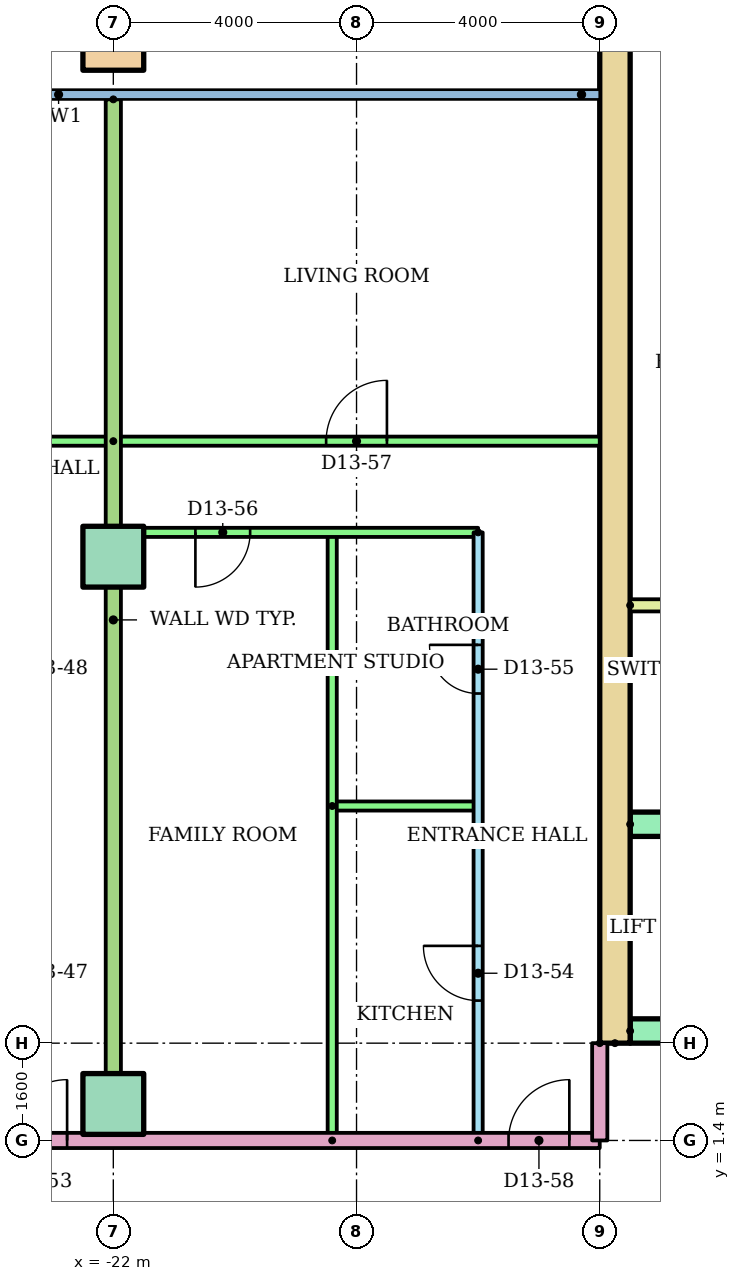
"""IFC4 building model, lengths in metres.
Left out: names, types, materials, properties, quantities, classifications, styles, units other than length and angle.
Written with IfcOpenShell. Run it as: python <this file> out.ifc"""

import sys

from ifc_helpers import new_model, si_unit, direction, frame, frame_2d, origin, origin_2d, place, context, subcontext, project, spatial, rectangle, hollow_rectangle, extrude, element, fill, save


model = new_model("IFC4")
c1 = context("Model", 3, precision=1e-05, world=origin(), true_north=direction((0.0, 1.0)))
c2 = subcontext(c1, "Body", "Model", "MODEL_VIEW")
j1 = project(units=[si_unit("LENGTHUNIT", "METRE"), si_unit("PLANEANGLEUNIT", "RADIAN")], contexts=[c1])
p1 = place(None, origin())
s1 = spatial("IfcSite", under=j1, at=p1, CompositionType="ELEMENT")
p2 = place(p1, origin())
s2 = spatial("IfcBuilding", under=s1, at=p2, CompositionType="ELEMENT")
p3 = place(p2, frame((0.0, 0.0, 51.2)))
s3 = spatial("IfcBuildingStorey", under=s2, at=p3, CompositionType="ELEMENT", Elevation=51.2)
for number, where in (
    (1, (-22.0, 2.0, 0.0)),
    (2, (-22.0, 11.0, 0.0)),
):
    element("IfcColumn", number, at=place(p3, frame(where)), inside=s3, PredefinedType="COLUMN", context=c2, shape_type="SweptSolid", body=[
        extrude(rectangle(XDim=1.0, YDim=1.0, at=origin_2d()), origin(), (0.0, 0.0, 1.0), 3.2),
    ])
p4 = place(p3, frame((-22.0, 19.5, 0.0)))
e3 = element("IfcColumn", 3, at=p4, inside=s3, PredefinedType="COLUMN", context=c2, shape_type="SweptSolid", body=[
    extrude(hollow_rectangle(XDim=1.0, YDim=1.0, WallThickness=0.05, at=origin_2d()), origin(), (0.0, 0.0, 1.0), 3.2),
])
p5 = place(p3, frame((-13.75, 3.0, 0.0), z_axis=(0.0, 0.0, 1.0), x_axis=(0.0, 1.0, 0.0)))
e4 = element("IfcWall", 4, at=p5, inside=s3, PredefinedType="SHEAR", context=c2, shape_type="SweptSolid", body=[
    extrude(rectangle(XDim=17.0, YDim=0.5, at=frame_2d((8.5, 0.0))), origin(), (0.0, 0.0, 1.0), 2.92),
])
p6 = place(p3, frame((-13.5, 3.2, 0.0)))
e5 = element("IfcWall", 5, at=p6, inside=s3, PredefinedType="SHEAR", context=c2, shape_type="SweptSolid", body=[
    extrude(rectangle(XDim=27.0, YDim=0.4, at=frame_2d((13.5, 0.0))), origin(), (0.0, 0.0, 1.0), 2.92),
])
p7 = place(p6, frame((6.861, 0.0, 0.0)))
e6 = element("IfcOpeningElement", 6, at=p7, cuts=e5, PredefinedType="OPENING", context=c2, shape_type="SweptSolid", body=[
    extrude(rectangle(XDim=1.1, YDim=2.1, at=frame_2d((0.55, 1.05))), frame((0.0, 0.21, 0.0), z_axis=(0.0, -1.0, 0.0), x_axis=(1.0, 0.0, 0.0)), (0.0, 0.0, 1.0), 0.42),
])
p8 = place(p6, frame((9.906, 0.0, 0.0)))
e7 = element("IfcOpeningElement", 7, at=p8, cuts=e5, PredefinedType="OPENING", context=c2, shape_type="SweptSolid", body=[
    extrude(rectangle(XDim=1.1, YDim=2.1, at=frame_2d((0.55, 1.05))), frame((0.0, 0.21, 0.0), z_axis=(0.0, -1.0, 0.0), x_axis=(1.0, 0.0, 0.0)), (0.0, 0.0, 1.0), 0.42),
])
p9 = place(p6, frame((15.994, 0.0, 0.0)))
e8 = element("IfcOpeningElement", 8, at=p9, cuts=e5, PredefinedType="OPENING", context=c2, shape_type="SweptSolid", body=[
    extrude(rectangle(XDim=1.1, YDim=2.1, at=frame_2d((0.55, 1.05))), frame((0.0, 0.21, 0.0), z_axis=(0.0, -1.0, 0.0), x_axis=(1.0, 0.0, 0.0)), (0.0, 0.0, 1.0), 0.42),
])
p10 = place(p6, frame((19.039, 0.0, 0.0)))
e9 = element("IfcOpeningElement", 9, at=p10, cuts=e5, PredefinedType="OPENING", context=c2, shape_type="SweptSolid", body=[
    extrude(rectangle(XDim=1.1, YDim=2.1, at=frame_2d((0.55, 1.05))), frame((0.0, 0.21, 0.0), z_axis=(0.0, -1.0, 0.0), x_axis=(1.0, 0.0, 0.0)), (0.0, 0.0, 1.0), 0.42),
])
p11 = place(p6, frame((12.6, 0.0, 0.0)))
e10 = element("IfcOpeningElement", 10, at=p11, cuts=e5, PredefinedType="OPENING", context=c2, shape_type="SweptSolid", body=[
    extrude(rectangle(XDim=1.8, YDim=2.1, at=frame_2d((0.9, 1.05))), frame((0.0, 0.21, 0.0), z_axis=(0.0, -1.0, 0.0), x_axis=(1.0, 0.0, 0.0)), (0.0, 0.0, 1.0), 0.42),
])
p12 = place(p3, frame((-13.5, 6.6, 0.0)))
e11 = element("IfcWall", 11, at=p12, inside=s3, PredefinedType="SHEAR", context=c2, shape_type="SweptSolid", body=[
    extrude(rectangle(XDim=11.978, YDim=0.4, at=frame_2d((5.989, 0.0))), origin(), (0.0, 0.0, 1.0), 2.92),
])
p13 = place(p3, frame((-13.5, 10.2, 0.0)))
e12 = element("IfcWall", 12, at=p13, inside=s3, PredefinedType="PARTITIONING", context=c2, shape_type="SweptSolid", body=[
    extrude(rectangle(XDim=3.9, YDim=0.2, at=frame_2d((1.95, 0.0))), origin(), (0.0, 0.0, 1.0), 2.92),
])
p14 = place(p3, frame((-36.52, 12.9, 0.0)))
e13 = element("IfcWall", 13, at=p14, inside=s3, PredefinedType="PARTITIONING", context=c2, shape_type="SweptSolid", body=[
    extrude(rectangle(XDim=14.52, YDim=0.15, at=frame_2d((7.26, 0.0))), origin(), (0.0, 0.0, 1.0), 2.4),
])
p15 = place(p14, frame((1.97, 0.0, 0.0)))
e14 = element("IfcOpeningElement", 14, at=p15, cuts=e13, PredefinedType="OPENING", context=c2, shape_type="SweptSolid", body=[
    extrude(rectangle(XDim=1.0, YDim=2.1, at=frame_2d((0.5, 1.05))), frame((0.0, 0.085, 0.0), z_axis=(0.0, -1.0, 0.0), x_axis=(1.0, 0.0, 0.0)), (0.0, 0.0, 1.0), 0.17),
])
p16 = place(p14, frame((9.12, 0.0, 0.0)))
e15 = element("IfcOpeningElement", 15, at=p16, cuts=e13, PredefinedType="OPENING", context=c2, shape_type="SweptSolid", body=[
    extrude(rectangle(XDim=1.0, YDim=2.1, at=frame_2d((0.5, 1.05))), frame((0.0, 0.085, 0.0), z_axis=(0.0, -1.0, 0.0), x_axis=(1.0, 0.0, 0.0)), (0.0, 0.0, 1.0), 0.17),
])
p17 = place(p3, frame((-16.0, 1.4, 0.0), z_axis=(0.0, 0.0, 1.0), x_axis=(0.0, 1.0, 0.0)))
e16 = element("IfcWall", 16, at=p17, inside=s3, PredefinedType="PARTITIONING", context=c2, shape_type="SweptSolid", body=[
    extrude(rectangle(XDim=10.0, YDim=0.15, at=frame_2d((5.0, 0.0))), origin(), (0.0, 0.0, 1.0), 2.4),
])
p18 = place(p17, frame((2.3, 0.0, 0.0)))
e17 = element("IfcOpeningElement", 17, at=p18, cuts=e16, PredefinedType="OPENING", context=c2, shape_type="SweptSolid", body=[
    extrude(rectangle(XDim=0.9, YDim=2.1, at=frame_2d((0.45, 1.05))), frame((0.0, 0.085, 0.0), z_axis=(0.0, -1.0, 0.0), x_axis=(1.0, 0.0, 0.0)), (0.0, 0.0, 1.0), 0.17),
])
p19 = place(p17, frame((7.35, 0.0, 0.0)))
e18 = element("IfcOpeningElement", 18, at=p19, cuts=e16, PredefinedType="OPENING", context=c2, shape_type="SweptSolid", body=[
    extrude(rectangle(XDim=0.8, YDim=2.1, at=frame_2d((0.4, 1.05))), frame((0.0, 0.085, 0.0), z_axis=(0.0, -1.0, 0.0), x_axis=(1.0, 0.0, 0.0)), (0.0, 0.0, 1.0), 0.17),
])
p20 = place(p3, frame((-18.4, 6.9, 0.0)))
e19 = element("IfcWall", 19, at=p20, inside=s3, PredefinedType="PARTITIONING", context=c2, shape_type="SweptSolid", body=[
    extrude(rectangle(XDim=2.4, YDim=0.15, at=frame_2d((1.2, 0.0))), origin(), (0.0, 0.0, 1.0), 2.4),
])
p21 = place(p3, frame((-18.4, 1.4, 0.0), z_axis=(0.0, 0.0, 1.0), x_axis=(0.0, 1.0, 0.0)))
e20 = element("IfcWall", 20, at=p21, inside=s3, PredefinedType="PARTITIONING", context=c2, shape_type="SweptSolid", body=[
    extrude(rectangle(XDim=10.0, YDim=0.15, at=frame_2d((5.0, 0.0))), origin(), (0.0, 0.0, 1.0), 2.4),
])
p22 = place(p3, frame((-16.0, 11.4, 0.0), z_axis=(0.0, 0.0, 1.0), x_axis=(-1.0, 0.0, 0.0)))
e21 = element("IfcWall", 21, at=p22, inside=s3, PredefinedType="PARTITIONING", context=c2, shape_type="SweptSolid", body=[
    extrude(rectangle(XDim=6.0, YDim=0.15, at=frame_2d((3.0, 0.0))), origin(), (0.0, 0.0, 1.0), 2.4),
])
p23 = place(p22, frame((3.75, 0.0, 0.0)))
e22 = element("IfcOpeningElement", 22, at=p23, cuts=e21, PredefinedType="OPENING", context=c2, shape_type="SweptSolid", body=[
    extrude(rectangle(XDim=0.9, YDim=2.1, at=frame_2d((0.45, 1.05))), frame((0.0, 0.085, 0.0), z_axis=(0.0, -1.0, 0.0), x_axis=(1.0, 0.0, 0.0)), (0.0, 0.0, 1.0), 0.17),
])
p24 = place(p3, frame((-22.0, 12.9, 0.0)))
e23 = element("IfcWall", 23, at=p24, inside=s3, PredefinedType="PARTITIONING", context=c2, shape_type="SweptSolid", body=[
    extrude(rectangle(XDim=8.0, YDim=0.15, at=frame_2d((4.0, 0.0))), origin(), (0.0, 0.0, 1.0), 2.4),
])
p25 = place(p24, frame((3.5, 0.0, 0.0)))
e24 = element("IfcOpeningElement", 24, at=p25, cuts=e23, PredefinedType="OPENING", context=c2, shape_type="SweptSolid", body=[
    extrude(rectangle(XDim=1.0, YDim=2.1, at=frame_2d((0.5, 1.05))), frame((0.0, 0.085, 0.0), z_axis=(0.0, -1.0, 0.0), x_axis=(1.0, 0.0, 0.0)), (0.0, 0.0, 1.0), 0.17),
])
p26 = place(p3, frame((-22.0, 18.521, 0.0), z_axis=(0.0, 0.0, 1.0), x_axis=(0.0, -1.0, 0.0)))
e25 = element("IfcWall", 25, at=p26, inside=s3, PredefinedType="PARTITIONING", context=c2, shape_type="SweptSolid", body=[
    extrude(rectangle(XDim=17.121, YDim=0.25, at=frame_2d((8.561, 0.0))), origin(), (0.0, 0.0, 1.0), 2.4),
])
p27 = place(p3, frame((-29.0, 1.4, 0.0)))
e26 = element("IfcWall", 26, at=p27, inside=s3, PredefinedType="PARTITIONING", context=c2, shape_type="SweptSolid", body=[
    extrude(rectangle(XDim=15.0, YDim=0.25, at=frame_2d((7.5, 0.0))), origin(), (0.0, 0.0, 1.0), 2.4),
])
p28 = place(p27, frame((5.24, 0.0, 0.0)))
e27 = element("IfcOpeningElement", 27, at=p28, cuts=e26, PredefinedType="OPENING", context=c2, shape_type="SweptSolid", body=[
    extrude(rectangle(XDim=1.0, YDim=2.1, at=frame_2d((0.5, 1.05))), frame((0.0, 0.135, 0.0), z_axis=(0.0, -1.0, 0.0), x_axis=(1.0, 0.0, 0.0)), (0.0, 0.0, 1.0), 0.27),
])
p29 = place(p27, frame((13.5, 0.0, 0.0)))
e28 = element("IfcOpeningElement", 28, at=p29, cuts=e26, PredefinedType="OPENING", context=c2, shape_type="SweptSolid", body=[
    extrude(rectangle(XDim=1.0, YDim=2.1, at=frame_2d((0.5, 1.05))), frame((0.0, 0.135, 0.0), z_axis=(0.0, -1.0, 0.0), x_axis=(1.0, 0.0, 0.0)), (0.0, 0.0, 1.0), 0.27),
])
p30 = place(p3, frame((-14.0, 3.0, 0.0), z_axis=(0.0, 0.0, 1.0), x_axis=(0.0, -1.0, 0.0)))
e29 = element("IfcWall", 29, at=p30, inside=s3, PredefinedType="PARTITIONING", context=c2, shape_type="SweptSolid", body=[
    extrude(rectangle(XDim=1.6, YDim=0.25, at=frame_2d((0.8, 0.0))), origin(), (0.0, 0.0, 1.0), 2.4),
])
p31 = place(p28, origin())
e30 = element("IfcDoor", 30, at=p31, inside=s3, OperationType="SINGLE_SWING_RIGHT", PredefinedType="DOOR", context=c2, shape_type="SweptSolid", body=[
    extrude(rectangle(XDim=1.0, YDim=2.1, at=frame_2d((0.5, 1.05))), frame((0.0, 0.025, 0.0), z_axis=(0.0, -1.0, 0.0), x_axis=(1.0, 0.0, 0.0)), (0.0, 0.0, 1.0), 0.05),
])
fill(e27, e30)
p32 = place(p18, origin())
e31 = element("IfcDoor", 31, at=p32, inside=s3, OperationType="SINGLE_SWING_RIGHT", PredefinedType="DOOR", context=c2, shape_type="SweptSolid", body=[
    extrude(rectangle(XDim=0.9, YDim=2.1, at=frame_2d((0.45, 1.05))), frame((0.0, 0.025, 0.0), z_axis=(0.0, -1.0, 0.0), x_axis=(1.0, 0.0, 0.0)), (0.0, 0.0, 1.0), 0.05),
])
fill(e17, e31)
p33 = place(p19, origin())
e32 = element("IfcDoor", 32, at=p33, inside=s3, OperationType="SINGLE_SWING_RIGHT", PredefinedType="DOOR", context=c2, shape_type="SweptSolid", body=[
    extrude(rectangle(XDim=0.8, YDim=2.1, at=frame_2d((0.4, 1.05))), frame((0.0, 0.025, 0.0), z_axis=(0.0, -1.0, 0.0), x_axis=(1.0, 0.0, 0.0)), (0.0, 0.0, 1.0), 0.05),
])
fill(e18, e32)
p34 = place(p23, origin())
e33 = element("IfcDoor", 33, at=p34, inside=s3, OperationType="SINGLE_SWING_RIGHT", PredefinedType="DOOR", context=c2, shape_type="SweptSolid", body=[
    extrude(rectangle(XDim=0.9, YDim=2.1, at=frame_2d((0.45, 1.05))), frame((0.0, 0.025, 0.0), z_axis=(0.0, -1.0, 0.0), x_axis=(1.0, 0.0, 0.0)), (0.0, 0.0, 1.0), 0.05),
])
fill(e22, e33)
p35 = place(p25, origin())
e34 = element("IfcDoor", 34, at=p35, inside=s3, OperationType="SINGLE_SWING_RIGHT", PredefinedType="DOOR", context=c2, shape_type="SweptSolid", body=[
    extrude(rectangle(XDim=1.0, YDim=2.1, at=frame_2d((0.5, 1.05))), frame((0.0, 0.025, 0.0), z_axis=(0.0, -1.0, 0.0), x_axis=(1.0, 0.0, 0.0)), (0.0, 0.0, 1.0), 0.05),
])
fill(e24, e34)
p36 = place(p29, origin())
e35 = element("IfcDoor", 35, at=p36, inside=s3, OperationType="SINGLE_SWING_RIGHT", PredefinedType="DOOR", context=c2, shape_type="SweptSolid", body=[
    extrude(rectangle(XDim=1.0, YDim=2.1, at=frame_2d((0.5, 1.05))), frame((0.0, 0.025, 0.0), z_axis=(0.0, -1.0, 0.0), x_axis=(1.0, 0.0, 0.0)), (0.0, 0.0, 1.0), 0.05),
])
fill(e28, e35)
save(model, sys.argv[1])
